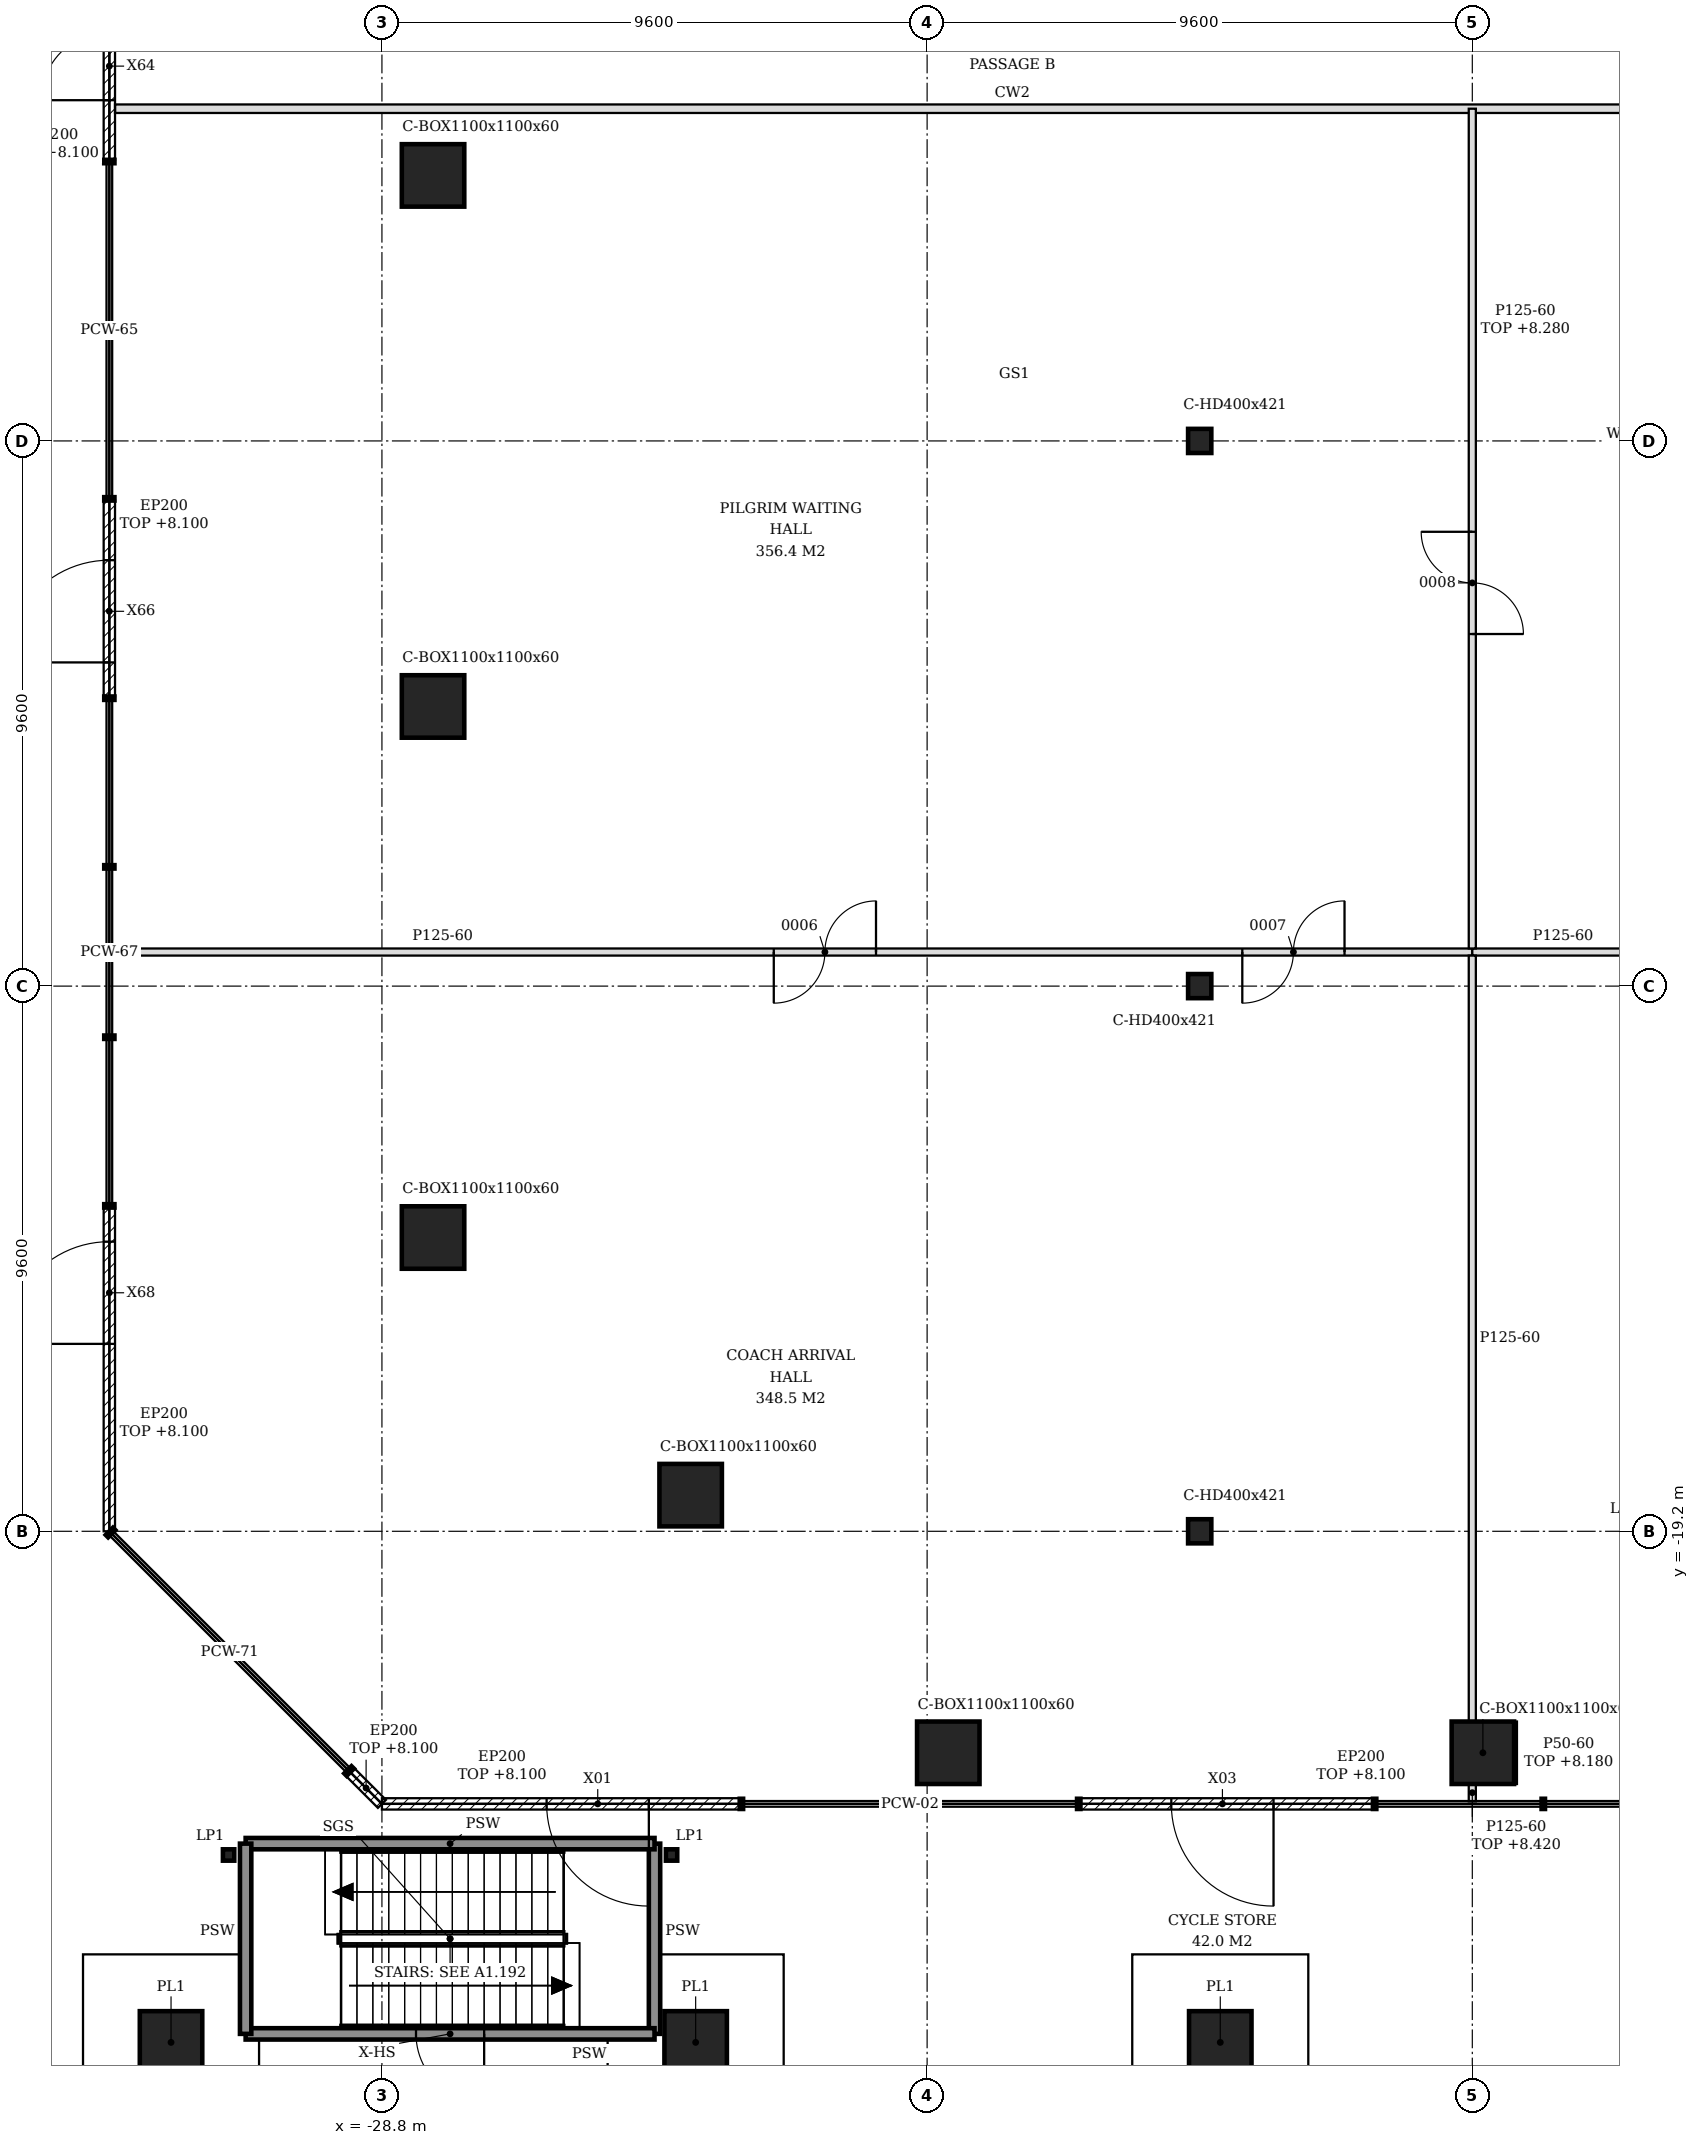
"""IFC4 building model, lengths in metres.
Left out: names, types, materials, properties, quantities, classifications, styles, units other than length and angle.
Written with IfcOpenShell. Run it as: python <this file> out.ifc"""

import sys

from ifc_helpers import new_model, si_unit, direction, frame, frame_2d, origin, origin_2d, place, context, subcontext, project, spatial, polyline, rectangle, hollow_rectangle, i_section, outline, extrude, element, fill, save


model = new_model("IFC4")
c1 = context("Model", 3, precision=1e-05, world=origin(), true_north=direction((0.0, 1.0)))
c2 = subcontext(c1, "Body", "Model", "MODEL_VIEW")
j1 = project(units=[si_unit("LENGTHUNIT", "METRE"), si_unit("PLANEANGLEUNIT", "RADIAN")], contexts=[c1])
p1 = place(None, origin())
s1 = spatial("IfcSite", under=j1, at=p1, CompositionType="ELEMENT")
p2 = place(p1, origin())
s2 = spatial("IfcBuilding", under=s1, at=p2, CompositionType="ELEMENT")
p3 = place(p2, origin())
s3 = spatial("IfcBuildingStorey", under=s2, at=p3, CompositionType="ELEMENT", Elevation=0.0)
for number, where, z_axis, x_axis in (
    (1, (-32.514, -28.2, -0.25), (0.0, 0.0, 1.0), (1.0, 0.0, 0.0)),
    (2, (-23.276, -28.2, -0.25), (0.0, 0.0, 1.0), (1.0, 0.0, 0.0)),
    (3, (-14.038, -28.2, -0.25), (0.0, 0.0, 1.0), (1.0, 0.0, 0.0)),
):
    element("IfcColumn", number, at=place(p3, frame(where, z_axis=z_axis, x_axis=x_axis)), inside=s3, PredefinedType="COLUMN", context=c2, shape_type="SweptSolid", body=[
        extrude(hollow_rectangle(XDim=1.1, YDim=1.1, WallThickness=0.06, at=origin_2d()), origin(), (0.0, 0.0, 1.0), 9.25),
    ])
for number, where, z_axis, x_axis in (
    (4, (-31.5, -24.9, -0.25), (0.0, 0.0, 1.0), (1.0, 0.0, 0.0)),
    (5, (-23.7, -24.9, -0.25), (0.0, 0.0, 1.0), (1.0, 0.0, 0.0)),
):
    element("IfcColumn", number, at=place(p3, frame(where, z_axis=z_axis, x_axis=x_axis)), inside=s3, PredefinedType="COLUMN", context=c2, shape_type="SweptSolid", body=[
        extrude(i_section(OverallWidth=0.2, OverallDepth=0.2, WebThickness=0.009, FlangeThickness=0.015, FilletRadius=0.018, at=origin_2d()), origin(), (0.0, 0.0, 1.0), 9.25),
    ])
for number, where, z_axis, x_axis in (
    (6, (-18.827, -23.1, -0.25), (0.0, 0.0, 1.0), (1.0, 0.0, 0.0)),
    (7, (-9.414, -23.1, -0.25), (0.0, 0.0, 1.0), (1.0, 0.0, 0.0)),
    (8, (-27.9, 4.676, -0.25), (0.0, 0.0, 1.0), (1.0, 0.0, 0.0)),
    (9, (-27.9, -4.676, -0.25), (0.0, 0.0, 1.0), (1.0, 0.0, 0.0)),
    (10, (-27.9, -14.027, -0.25), (0.0, 0.0, 1.0), (1.0, 0.0, 0.0)),
    (11, (-23.364, -18.564, -0.25), (0.0, 0.0, 1.0), (1.0, 0.0, 0.0)),
):
    element("IfcColumn", number, at=place(p3, frame(where, z_axis=z_axis, x_axis=x_axis)), inside=s3, PredefinedType="COLUMN", context=c2, shape_type="SweptSolid", body=[
        extrude(hollow_rectangle(XDim=1.1, YDim=1.1, WallThickness=0.06, at=origin_2d()), origin(), (0.0, 0.0, 1.0), 9.05),
    ])
for number, where, z_axis, x_axis in (
    (12, (-14.4, -19.2, -0.25), (0.0, 0.0, 1.0), (1.0, 0.0, 0.0)),
    (13, (-14.4, -9.6, -0.25), (0.0, 0.0, 1.0), (1.0, 0.0, 0.0)),
    (14, (-14.4, 0.0, -0.25), (0.0, 0.0, 1.0), (1.0, 0.0, 0.0)),
):
    element("IfcColumn", number, at=place(p3, frame(where, z_axis=z_axis, x_axis=x_axis)), inside=s3, PredefinedType="COLUMN", context=c2, shape_type="SweptSolid", body=[
        extrude(i_section(OverallWidth=0.409, OverallDepth=0.425, WebThickness=0.033, FlangeThickness=0.052, FilletRadius=0.015, at=origin_2d()), origin(), (0.0, 0.0, 1.0), 9.05),
    ])
p4 = place(p3, frame((-22.5, -24.0, 0.0), z_axis=(0.0, 0.0, 1.0), x_axis=(-1.0, 0.0, 0.0)))
e15 = element("IfcWall", 15, at=p4, inside=s3, PredefinedType="SOLIDWALL", context=c2, shape_type="SweptSolid", body=[
    extrude(rectangle(XDim=6.3, YDim=0.2, at=frame_2d((3.15, 0.0))), origin(), (0.0, 0.0, 1.0), 8.1),
])
p5 = place(p4, frame((1.6, 0.0, 0.0)))
e16 = element("IfcOpeningElement", 16, at=p5, cuts=e15, PredefinedType="OPENING", context=c2, shape_type="SweptSolid", body=[
    extrude(rectangle(XDim=1.8, YDim=2.1, at=frame_2d((0.9, 1.05))), frame((0.0, 0.11, 0.0), z_axis=(0.0, -1.0, 0.0), x_axis=(1.0, 0.0, 0.0)), (0.0, 0.0, 1.0), 0.22),
])
p6 = place(p3, frame((-11.35, -24.0, 0.0), z_axis=(0.0, 0.0, 1.0), x_axis=(-1.0, 0.0, 0.0)))
e17 = element("IfcWall", 17, at=p6, inside=s3, PredefinedType="SOLIDWALL", context=c2, shape_type="SweptSolid", body=[
    extrude(rectangle(XDim=5.15, YDim=0.2, at=frame_2d((2.575, 0.0))), origin(), (0.0, 0.0, 1.0), 8.1),
])
p7 = place(p6, frame((1.75, 0.0, 0.0)))
e18 = element("IfcOpeningElement", 18, at=p7, cuts=e17, PredefinedType="OPENING", context=c2, shape_type="SweptSolid", body=[
    extrude(rectangle(XDim=1.8, YDim=2.1, at=frame_2d((0.9, 1.05))), frame((0.0, 0.11, 0.0), z_axis=(0.0, -1.0, 0.0), x_axis=(1.0, 0.0, 0.0)), (0.0, 0.0, 1.0), 0.22),
])
p8 = place(p3, frame((-33.6, 4.95, 0.0), z_axis=(0.0, 0.0, 1.0), x_axis=(0.0, 1.0, 0.0)))
e19 = element("IfcWall", 19, at=p8, inside=s3, PredefinedType="SOLIDWALL", context=c2, shape_type="SweptSolid", body=[
    extrude(rectangle(XDim=3.2, YDim=0.2, at=frame_2d((1.6, 0.0))), origin(), (0.0, 0.0, 1.0), 8.1),
])
p9 = place(p8, frame((1.05, 0.0, 0.0)))
e20 = element("IfcOpeningElement", 20, at=p9, cuts=e19, PredefinedType="OPENING", context=c2, shape_type="SweptSolid", body=[
    extrude(rectangle(XDim=1.2, YDim=2.1, at=frame_2d((0.6, 1.05))), frame((0.0, 0.11, 0.0), z_axis=(0.0, -1.0, 0.0), x_axis=(1.0, 0.0, 0.0)), (0.0, 0.0, 1.0), 0.22),
])
p10 = place(p3, frame((-33.6, -4.5, 0.0), z_axis=(0.0, 0.0, 1.0), x_axis=(0.0, 1.0, 0.0)))
e21 = element("IfcWall", 21, at=p10, inside=s3, PredefinedType="SOLIDWALL", context=c2, shape_type="SweptSolid", body=[
    extrude(rectangle(XDim=3.45, YDim=0.2, at=frame_2d((1.725, 0.0))), origin(), (0.0, 0.0, 1.0), 8.1),
])
p11 = place(p10, frame((0.6, 0.0, 0.0)))
e22 = element("IfcOpeningElement", 22, at=p11, cuts=e21, PredefinedType="OPENING", context=c2, shape_type="SweptSolid", body=[
    extrude(rectangle(XDim=1.8, YDim=2.1, at=frame_2d((0.9, 1.05))), frame((0.0, 0.11, 0.0), z_axis=(0.0, -1.0, 0.0), x_axis=(1.0, 0.0, 0.0)), (0.0, 0.0, 1.0), 0.22),
])
p12 = place(p3, frame((-33.6, -19.2, 0.0), z_axis=(0.0, 0.0, 1.0), x_axis=(0.0, 1.0, 0.0)))
e23 = element("IfcWall", 23, at=p12, inside=s3, PredefinedType="SOLIDWALL", context=c2, shape_type="SweptSolid", body=[
    extrude(rectangle(XDim=5.7, YDim=0.2, at=frame_2d((2.85, 0.0))), origin(), (0.0, 0.0, 1.0), 8.1),
])
p13 = place(p12, frame((3.3, 0.0, 0.0)))
e24 = element("IfcOpeningElement", 24, at=p13, cuts=e23, PredefinedType="OPENING", context=c2, shape_type="SweptSolid", body=[
    extrude(rectangle(XDim=1.8, YDim=2.1, at=frame_2d((0.9, 1.05))), frame((0.0, 0.11, 0.0), z_axis=(0.0, -1.0, 0.0), x_axis=(1.0, 0.0, 0.0)), (0.0, 0.0, 1.0), 0.22),
])
p14 = place(p3, frame((-28.8, -24.0, 0.0), z_axis=(0.0, 0.0, 1.0), x_axis=(-0.707106781187, 0.707106781187, 0.0)))
e25 = element("IfcWall", 25, at=p14, inside=s3, PredefinedType="SOLIDWALL", context=c2, shape_type="SweptSolid", body=[
    extrude(rectangle(XDim=0.788, YDim=0.2, at=frame_2d((0.394, 0.0))), origin(), (0.0, 0.0, 1.0), 8.1),
])
p15 = place(p3, frame((-31.2, -28.05, 0.0), z_axis=(0.0, 0.0, 1.0), x_axis=(0.0, 1.0, 0.0)))
e26 = element("IfcWall", 26, at=p15, inside=s3, PredefinedType="SOLIDWALL", context=c2, shape_type="SweptSolid", body=[
    extrude(rectangle(XDim=3.35, YDim=0.2, at=frame_2d((1.675, 0.0))), origin(), (0.0, 0.0, 1.0), 8.8),
])
p16 = place(p3, frame((-31.2, -24.7, 0.0), z_axis=(0.0, 0.0, 1.0), x_axis=(1.0, 0.0, 0.0)))
e27 = element("IfcWall", 27, at=p16, inside=s3, PredefinedType="SOLIDWALL", context=c2, shape_type="SweptSolid", body=[
    extrude(rectangle(XDim=7.2, YDim=0.2, at=frame_2d((3.6, 0.0))), origin(), (0.0, 0.0, 1.0), 8.8),
])
p17 = place(p3, frame((-24.0, -24.7, 0.0), z_axis=(0.0, 0.0, 1.0), x_axis=(0.0, -1.0, 0.0)))
e28 = element("IfcWall", 28, at=p17, inside=s3, PredefinedType="SOLIDWALL", context=c2, shape_type="SweptSolid", body=[
    extrude(rectangle(XDim=3.35, YDim=0.2, at=frame_2d((1.675, 0.0))), origin(), (0.0, 0.0, 1.0), 8.8),
])
p18 = place(p3, frame((-24.0, -28.05, 0.0), z_axis=(0.0, 0.0, 1.0), x_axis=(-1.0, 0.0, 0.0)))
e29 = element("IfcWall", 29, at=p18, inside=s3, PredefinedType="SOLIDWALL", context=c2, shape_type="SweptSolid", body=[
    extrude(rectangle(XDim=7.2, YDim=0.2, at=frame_2d((3.6, 0.0))), origin(), (0.0, 0.0, 1.0), 8.8),
])
p19 = place(p18, frame((3.0, 0.0, 0.0)))
e30 = element("IfcOpeningElement", 30, at=p19, cuts=e29, PredefinedType="OPENING", context=c2, shape_type="SweptSolid", body=[
    extrude(rectangle(XDim=1.2, YDim=2.1, at=frame_2d((0.6, 1.05))), frame((0.0, 0.11, 0.0), z_axis=(0.0, -1.0, 0.0), x_axis=(1.0, 0.0, 0.0)), (0.0, 0.0, 1.0), 0.22),
])
p20 = place(p3, frame((-33.5, 5.85, 0.0), z_axis=(0.0, 0.0, 1.0), x_axis=(1.0, 0.0, 0.0)))
e31 = element("IfcWall", 31, at=p20, inside=s3, PredefinedType="SOLIDWALL", context=c2, shape_type="SweptSolid", body=[
    extrude(rectangle(XDim=31.6, YDim=0.15, at=frame_2d((15.8, 0.0))), origin(), (0.0, 0.0, 1.0), 8.8),
])
p21 = place(p3, frame((-9.6, -23.956, 0.0), z_axis=(0.0, 0.0, 1.0), x_axis=(0.0, 1.0, 0.0)))
e32 = element("IfcWall", 32, at=p21, inside=s3, PredefinedType="PARTITIONING", context=c2, shape_type="SweptSolid", body=[
    extrude(rectangle(XDim=0.306, YDim=0.125, at=frame_2d((0.153, 0.0))), origin(), (0.0, 0.0, 1.0), 8.42),
])
p22 = place(p3, frame((-9.6, -22.55, 0.0), z_axis=(0.0, 0.0, 1.0), x_axis=(0.0, 1.0, 0.0)))
e33 = element("IfcWall", 33, at=p22, inside=s3, PredefinedType="PARTITIONING", context=c2, shape_type="SweptSolid", body=[
    extrude(rectangle(XDim=13.488, YDim=0.125, at=frame_2d((6.744, 0.0))), origin(), (0.0, 0.0, 1.0), 8.8),
])
p23 = place(p3, frame((-33.556, -9.0, 0.0), z_axis=(0.0, 0.0, 1.0), x_axis=(1.0, 0.0, 0.0)))
e34 = element("IfcWall", 34, at=p23, inside=s3, PredefinedType="PARTITIONING", context=c2, shape_type="SweptSolid", body=[
    extrude(outline(polyline([(0.0, 0.0), (23.956, 0.0), (23.956, 8.8), (19.256, 8.8), (19.254, 8.28), (19.056, 8.28), (19.054, 8.8), (14.456, 8.8), (14.454, 8.28), (14.256, 8.28), (14.254, 8.8), (9.656, 8.8), (9.654, 8.28), (9.456, 8.28), (9.454, 8.8), (5.806, 8.8), (5.804, 8.18), (5.506, 8.18), (5.504, 8.8), (0.0, 8.8), (0.0, 0.0)])), frame((0.0, 0.062, 0.0), z_axis=(0.0, -1.0, 0.0), x_axis=(1.0, 0.0, 0.0)), (0.0, 0.0, 1.0), 0.125),
])
p24 = place(p23, frame((11.656, 0.0, 0.0)))
e35 = element("IfcOpeningElement", 35, at=p24, cuts=e34, PredefinedType="OPENING", context=c2, shape_type="SweptSolid", body=[
    extrude(rectangle(XDim=1.8, YDim=2.1, at=frame_2d((0.9, 1.05))), frame((0.0, 0.073, 0.0), z_axis=(0.0, -1.0, 0.0), x_axis=(1.0, 0.0, 0.0)), (0.0, 0.0, 1.0), 0.145),
])
p25 = place(p23, frame((19.906, 0.0, 0.0)))
e36 = element("IfcOpeningElement", 36, at=p25, cuts=e34, PredefinedType="OPENING", context=c2, shape_type="SweptSolid", body=[
    extrude(rectangle(XDim=1.8, YDim=2.1, at=frame_2d((0.9, 1.05))), frame((0.0, 0.073, 0.0), z_axis=(0.0, -1.0, 0.0), x_axis=(1.0, 0.0, 0.0)), (0.0, 0.0, 1.0), 0.145),
])
p26 = place(p3, frame((-9.6, -9.0, 0.0), z_axis=(0.0, 0.0, 1.0), x_axis=(1.0, 0.0, 0.0)))
e37 = element("IfcWall", 37, at=p26, inside=s3, PredefinedType="PARTITIONING", context=c2, shape_type="SweptSolid", body=[
    extrude(outline(polyline([(0.0, 0.0), (7.138, 0.0), (7.137, 8.8), (4.95, 8.8), (4.948, 8.18), (4.65, 8.18), (4.648, 8.8), (0.0, 8.8), (0.0, 0.0)])), frame((0.0, 0.062, 0.0), z_axis=(0.0, -1.0, 0.0), x_axis=(1.0, 0.0, 0.0)), (0.0, 0.0, 1.0), 0.125),
])
p27 = place(p26, frame((3.2, 0.0, 0.0)))
e38 = element("IfcOpeningElement", 38, at=p27, cuts=e37, PredefinedType="OPENING", context=c2, shape_type="SweptSolid", body=[
    extrude(rectangle(XDim=0.9, YDim=2.1, at=frame_2d((0.45, 1.05))), frame((0.0, 0.073, 0.0), z_axis=(0.0, -1.0, 0.0), x_axis=(1.0, 0.0, 0.0)), (0.0, 0.0, 1.0), 0.145),
])
p28 = place(p3, frame((-9.6, -8.938, 0.0), z_axis=(0.0, 0.0, 1.0), x_axis=(0.0, 1.0, 0.0)))
e39 = element("IfcWall", 39, at=p28, inside=s3, PredefinedType="PARTITIONING", context=c2, shape_type="SweptSolid", body=[
    extrude(outline(polyline([(0.0, 0.0), (14.788, 0.0), (14.788, 8.28), (9.087, 8.28), (9.085, 8.18), (8.788, 8.18), (8.785, 8.28), (0.0, 8.28), (0.0, 0.0)])), frame((0.0, 0.062, 0.0), z_axis=(0.0, -1.0, 0.0), x_axis=(1.0, 0.0, 0.0)), (0.0, 0.0, 1.0), 0.125),
])
p29 = place(p28, frame((5.538, 0.0, 0.0)))
e40 = element("IfcOpeningElement", 40, at=p29, cuts=e39, PredefinedType="OPENING", context=c2, shape_type="SweptSolid", body=[
    extrude(rectangle(XDim=1.8, YDim=2.1, at=frame_2d((0.9, 1.05))), frame((0.0, 0.073, 0.0), z_axis=(0.0, -1.0, 0.0), x_axis=(1.0, 0.0, 0.0)), (0.0, 0.0, 1.0), 0.145),
])
p30 = place(p3, frame((-8.839, -23.65, 0.0), z_axis=(0.0, 0.0, 1.0), x_axis=(0.0, 1.0, 0.0)))
e41 = element("IfcWall", 41, at=p30, inside=s3, PredefinedType="PARTITIONING", context=c2, shape_type="SweptSolid", body=[
    extrude(rectangle(XDim=1.1, YDim=0.05, at=frame_2d((0.55, 0.0))), origin(), (0.0, 0.0, 1.0), 8.18),
])
p31 = place(p5, origin())
e42 = element("IfcDoor", 42, at=p31, inside=s3, OperationType="SINGLE_SWING_LEFT", PredefinedType="DOOR", context=c2, shape_type="SweptSolid", body=[
    extrude(rectangle(XDim=1.8, YDim=2.1, at=frame_2d((0.9, 1.05))), frame((0.0, 0.025, 0.0), z_axis=(0.0, -1.0, 0.0), x_axis=(1.0, 0.0, 0.0)), (0.0, 0.0, 1.0), 0.05),
])
fill(e16, e42)
p32 = place(p7, origin())
e43 = element("IfcDoor", 43, at=p32, inside=s3, OperationType="SINGLE_SWING_LEFT", PredefinedType="DOOR", context=c2, shape_type="SweptSolid", body=[
    extrude(rectangle(XDim=1.8, YDim=2.1, at=frame_2d((0.9, 1.05))), frame((0.0, 0.025, 0.0), z_axis=(0.0, -1.0, 0.0), x_axis=(1.0, 0.0, 0.0)), (0.0, 0.0, 1.0), 0.05),
])
fill(e18, e43)
p33 = place(p9, origin())
e44 = element("IfcDoor", 44, at=p33, inside=s3, OperationType="SINGLE_SWING_LEFT", PredefinedType="DOOR", context=c2, shape_type="SweptSolid", body=[
    extrude(rectangle(XDim=1.2, YDim=2.1, at=frame_2d((0.6, 1.05))), frame((0.0, 0.025, 0.0), z_axis=(0.0, -1.0, 0.0), x_axis=(1.0, 0.0, 0.0)), (0.0, 0.0, 1.0), 0.05),
])
fill(e20, e44)
p34 = place(p11, origin())
e45 = element("IfcDoor", 45, at=p34, inside=s3, OperationType="SINGLE_SWING_LEFT", PredefinedType="DOOR", context=c2, shape_type="SweptSolid", body=[
    extrude(rectangle(XDim=1.8, YDim=2.1, at=frame_2d((0.9, 1.05))), frame((0.0, 0.025, 0.0), z_axis=(0.0, -1.0, 0.0), x_axis=(1.0, 0.0, 0.0)), (0.0, 0.0, 1.0), 0.05),
])
fill(e22, e45)
p35 = place(p13, origin())
e46 = element("IfcDoor", 46, at=p35, inside=s3, OperationType="SINGLE_SWING_LEFT", PredefinedType="DOOR", context=c2, shape_type="SweptSolid", body=[
    extrude(rectangle(XDim=1.8, YDim=2.1, at=frame_2d((0.9, 1.05))), frame((0.0, 0.025, 0.0), z_axis=(0.0, -1.0, 0.0), x_axis=(1.0, 0.0, 0.0)), (0.0, 0.0, 1.0), 0.05),
])
fill(e24, e46)
p36 = place(p19, origin())
e47 = element("IfcDoor", 47, at=p36, inside=s3, OperationType="SINGLE_SWING_LEFT", PredefinedType="DOOR", context=c2, shape_type="SweptSolid", body=[
    extrude(rectangle(XDim=1.2, YDim=2.1, at=frame_2d((0.6, 1.05))), frame((0.0, 0.025, 0.0), z_axis=(0.0, -1.0, 0.0), x_axis=(1.0, 0.0, 0.0)), (0.0, 0.0, 1.0), 0.05),
])
fill(e30, e47)
p37 = place(p24, origin())
e48 = element("IfcDoor", 48, at=p37, inside=s3, OperationType="DOUBLE_DOOR_SINGLE_SWING", PredefinedType="DOOR", context=c2, shape_type="SweptSolid", body=[
    extrude(rectangle(XDim=1.8, YDim=2.1, at=frame_2d((0.9, 1.05))), frame((0.0, 0.025, 0.0), z_axis=(0.0, -1.0, 0.0), x_axis=(1.0, 0.0, 0.0)), (0.0, 0.0, 1.0), 0.05),
])
fill(e35, e48)
p38 = place(p25, origin())
e49 = element("IfcDoor", 49, at=p38, inside=s3, OperationType="DOUBLE_DOOR_SINGLE_SWING", PredefinedType="DOOR", context=c2, shape_type="SweptSolid", body=[
    extrude(rectangle(XDim=1.8, YDim=2.1, at=frame_2d((0.9, 1.05))), frame((0.0, 0.025, 0.0), z_axis=(0.0, -1.0, 0.0), x_axis=(1.0, 0.0, 0.0)), (0.0, 0.0, 1.0), 0.05),
])
fill(e36, e49)
p39 = place(p29, frame((1.8, 0.0, 0.0), z_axis=(0.0, 0.0, 1.0), x_axis=(-1.0, 0.0, 0.0)))
e50 = element("IfcDoor", 50, at=p39, inside=s3, OperationType="DOUBLE_DOOR_SINGLE_SWING", PredefinedType="DOOR", context=c2, shape_type="SweptSolid", body=[
    extrude(rectangle(XDim=1.8, YDim=2.1, at=frame_2d((0.9, 1.05))), frame((0.0, 0.025, 0.0), z_axis=(0.0, -1.0, 0.0), x_axis=(1.0, 0.0, 0.0)), (0.0, 0.0, 1.0), 0.05),
])
fill(e40, e50)
save(model, sys.argv[1])
